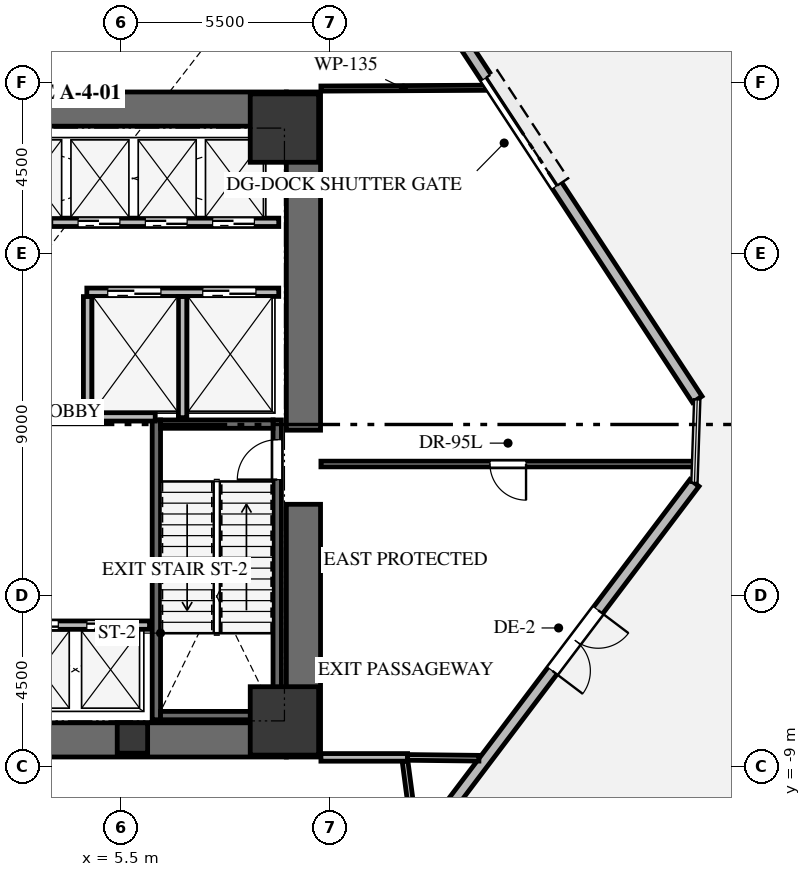
"""IFC4 building model, lengths in metres.
Left out: names, types, materials, properties, quantities, classifications, styles, units other than length and angle.
Written with IfcOpenShell. Run it as: python <this file> out.ifc"""

import sys

from ifc_helpers import new_model, si_unit, direction, frame, frame_2d, origin, origin_2d, place, context, subcontext, project, spatial, rectangle, extrude, source, transform, mapped, element, fill, save


model = new_model("IFC4")
c1 = context("Model", 3, precision=1e-05, world=origin(), true_north=direction((0.0, 1.0)))
c2 = subcontext(c1, "Body", "Model", "MODEL_VIEW")
j1 = project(units=[si_unit("LENGTHUNIT", "METRE"), si_unit("PLANEANGLEUNIT", "RADIAN")], contexts=[c1])
p1 = place(None, origin())
s1 = spatial("IfcSite", under=j1, at=p1, CompositionType="ELEMENT")
p2 = place(p1, origin())
s2 = spatial("IfcBuilding", under=s1, at=p2, CompositionType="ELEMENT")
p3 = place(p2, origin())
s3 = spatial("IfcBuildingStorey", under=s2, at=p3, CompositionType="ELEMENT", Elevation=0.0)
p4 = place(p3, frame((10.3, -8.75, 0.0), z_axis=(0.0, 0.0, 1.0), x_axis=(0.0, 1.0, 0.0)))
e1 = element("IfcWall", 1, at=p4, inside=s3, PredefinedType="SHEAR", context=c2, shape_type="SweptSolid", body=[
    extrude(rectangle(XDim=6.65, YDim=0.9, at=frame_2d((3.325, 0.0))), origin(), (0.0, 0.0, 1.0), 5.2),
])
p5 = place(p3, frame((10.3, -0.15, 0.0), z_axis=(0.0, 0.0, 1.0), x_axis=(0.0, 1.0, 0.0)))
e2 = element("IfcWall", 2, at=p5, inside=s3, PredefinedType="SHEAR", context=c2, shape_type="SweptSolid", body=[
    extrude(rectangle(XDim=8.9, YDim=0.9, at=frame_2d((4.45, 0.0))), origin(), (0.0, 0.0, 1.0), 5.2),
])
p6 = place(p3, frame((2.1, -8.3, 0.0), z_axis=(0.0, 0.0, 1.0), x_axis=(1.0, 0.0, 0.0)))
e3 = element("IfcWall", 3, at=p6, inside=s3, PredefinedType="SHEAR", context=c2, shape_type="SweptSolid", body=[
    extrude(rectangle(XDim=7.75, YDim=0.9, at=frame_2d((3.875, 0.0))), origin(), (0.0, 0.0, 1.0), 5.2),
])
p7 = place(p3, frame((1.9, 8.3, 0.0), z_axis=(0.0, 0.0, 1.0), x_axis=(1.0, 0.0, 0.0)))
e4 = element("IfcWall", 4, at=p7, inside=s3, PredefinedType="SHEAR", context=c2, shape_type="SweptSolid", body=[
    extrude(rectangle(XDim=7.95, YDim=0.9, at=frame_2d((3.975, 0.0))), origin(), (0.0, 0.0, 1.0), 5.2),
])
p8 = place(p3, frame((9.61, -7.77, -0.3), z_axis=(0.0, 0.0, 1.0), x_axis=(0.0, 1.0, 0.0)))
e5 = element("IfcWall", 5, at=p8, inside=s3, PredefinedType="SHEAR", context=c2, shape_type="SweptSolid", body=[
    extrude(rectangle(XDim=7.89, YDim=0.22, at=frame_2d((3.945, 0.0))), origin(), (0.0, 0.0, 1.0), 5.2),
])
p9 = place(p8, frame((6.32, 0.0, 0.0)))
e6 = element("IfcOpeningElement", 6, at=p9, cuts=e5, PredefinedType="OPENING", context=c2, shape_type="SweptSolid", body=[
    extrude(rectangle(XDim=1.05, YDim=2.15, at=frame_2d((0.525, 1.075))), frame((0.0, 0.12, 0.0), z_axis=(0.0, -1.0, 0.0), x_axis=(1.0, 0.0, 0.0)), (0.0, 0.0, 1.0), 0.24),
])
p10 = place(p3, frame((6.43, 0.12, -0.3), z_axis=(0.0, 0.0, 1.0), x_axis=(0.0, -1.0, 0.0)))
e7 = element("IfcWall", 7, at=p10, inside=s3, PredefinedType="SHEAR", context=c2, shape_type="SweptSolid", body=[
    extrude(rectangle(XDim=7.89, YDim=0.22, at=frame_2d((3.945, 0.0))), origin(), (0.0, 0.0, 1.0), 5.2),
])
for number, where, z_axis, x_axis in (
    (8, (6.54, -7.66, -0.3), (0.0, 0.0, 1.0), (1.0, 0.0, 0.0)),
    (9, (9.5, 0.01, -0.3), (0.0, 0.0, 1.0), (-1.0, 0.0, 0.0)),
):
    element("IfcWall", number, at=place(p3, frame(where, z_axis=z_axis, x_axis=x_axis)), inside=s3, PredefinedType="SHEAR", context=c2, shape_type="SweptSolid", body=[
        extrude(rectangle(XDim=2.96, YDim=0.22, at=frame_2d((1.48, 0.0))), origin(), (0.0, 0.0, 1.0), 5.2),
    ])
m1 = source(origin(), c2, "Body", "SweptSolid", [
    extrude(rectangle(XDim=1.8, YDim=1.8, at=origin_2d()), origin(), (0.0, 0.0, 1.0), 5.2),
])
for number, where, z_axis, x_axis in (
    (10, (9.8, -7.8, -0.3), (0.0, 0.0, 1.0), (1.0, 0.0, 0.0)),
    (11, (9.8, 7.8, -0.3), (0.0, 0.0, 1.0), (1.0, 0.0, 0.0)),
):
    element("IfcColumn", number, at=place(p3, frame(where, z_axis=z_axis, x_axis=x_axis)), inside=s3, PredefinedType="COLUMN", context=c2, shape_type="MappedRepresentation", body=[
        mapped(m1, transform((0.0, 0.0, 0.0), x_axis=(1.0, 0.0, 0.0), y_axis=(0.0, 1.0, 0.0), z_axis=(0.0, 0.0, 1.0), scale=1.0)),
    ])
m2 = source(origin(), c2, "Body", "SweptSolid", [
    extrude(rectangle(XDim=0.8, YDim=0.8, at=origin_2d()), origin(), (0.0, 0.0, 1.0), 5.2),
])
p11 = place(p3, frame((5.8, -8.25, -0.3), z_axis=(0.0, 0.0, 1.0), x_axis=(1.0, 0.0, 0.0)))
e12 = element("IfcColumn", 12, at=p11, inside=s3, PredefinedType="PILASTER", context=c2, shape_type="MappedRepresentation", body=[
    mapped(m2, transform((0.0, 0.0, 0.0), x_axis=(1.0, 0.0, 0.0), y_axis=(0.0, 1.0, 0.0), z_axis=(0.0, 0.0, 1.0), scale=1.0)),
])
p12 = place(p3, frame((11.422, 14.754, 0.0), z_axis=(0.0, 0.0, 1.0), x_axis=(0.548298501614, -0.836282699288, 0.0)))
e13 = element("IfcWall", 13, at=p12, inside=s3, PredefinedType="SOLIDWALL", context=c2, shape_type="SweptSolid", body=[
    extrude(rectangle(XDim=16.853, YDim=0.3, at=frame_2d((8.426, 0.0))), origin(), (0.0, 0.0, 1.0), 4.9),
])
p13 = place(p12, frame((6.726, 0.0, 0.0)))
e14 = element("IfcOpeningElement", 14, at=p13, cuts=e13, PredefinedType="OPENING", context=c2, shape_type="SweptSolid", body=[
    extrude(rectangle(XDim=3.4, YDim=4.2, at=frame_2d((1.7, 2.1))), frame((0.0, 0.16, 0.0), z_axis=(0.0, -1.0, 0.0), x_axis=(1.0, 0.0, 0.0)), (0.0, 0.0, 1.0), 0.32),
])
p14 = place(p3, frame((20.589, -1.538, 0.0), z_axis=(0.0, 0.0, 1.0), x_axis=(-0.603015201292, -0.797729695455, 0.0)))
e15 = element("IfcWall", 15, at=p14, inside=s3, PredefinedType="SOLIDWALL", context=c2, shape_type="SweptSolid", body=[
    extrude(rectangle(XDim=16.65, YDim=0.3, at=frame_2d((8.325, 0.0))), origin(), (0.0, 0.0, 1.0), 4.9),
])
p15 = place(p14, frame((4.2, 0.0, 0.0)))
e16 = element("IfcOpeningElement", 16, at=p15, cuts=e15, PredefinedType="OPENING", context=c2, shape_type="SweptSolid", body=[
    extrude(rectangle(XDim=2.0, YDim=2.3, at=frame_2d((1.0, 1.15))), frame((0.0, 0.16, 0.0), z_axis=(0.0, -1.0, 0.0), x_axis=(1.0, 0.0, 0.0)), (0.0, 0.0, 1.0), 0.32),
])
p16 = place(p3, frame((4.6, 3.48, 0.0), z_axis=(0.0, 0.0, 1.0), x_axis=(1.0, 0.0, 0.0)))
e17 = element("IfcWall", 17, at=p16, inside=s3, PredefinedType="SOLIDWALL", context=c2, shape_type="SweptSolid", body=[
    extrude(rectangle(XDim=5.05, YDim=0.22, at=frame_2d((2.525, 0.0))), origin(), (0.0, 0.0, 1.0), 4.885),
])
p17 = place(p16, frame((0.55, 0.0, 0.0)))
e18 = element("IfcOpeningElement", 18, at=p17, cuts=e17, PredefinedType="OPENING", context=c2, shape_type="SweptSolid", body=[
    extrude(rectangle(XDim=1.4, YDim=2.15, at=frame_2d((0.7, 1.075))), frame((0.0, 0.12, 0.0), z_axis=(0.0, -1.0, 0.0), x_axis=(1.0, 0.0, 0.0)), (0.0, 0.0, 1.0), 0.24),
])
p18 = place(p16, frame((3.05, 0.0, 0.0)))
e19 = element("IfcOpeningElement", 19, at=p18, cuts=e17, PredefinedType="OPENING", context=c2, shape_type="SweptSolid", body=[
    extrude(rectangle(XDim=1.4, YDim=2.15, at=frame_2d((0.7, 1.075))), frame((0.0, 0.12, 0.0), z_axis=(0.0, -1.0, 0.0), x_axis=(1.0, 0.0, 0.0)), (0.0, 0.0, 1.0), 0.24),
])
for number, where, z_axis, x_axis in (
    (20, (4.62, 0.18, 0.0), (0.0, 0.0, 1.0), (0.0, 1.0, 0.0)),
    (21, (7.12, 0.18, 0.0), (0.0, 0.0, 1.0), (0.0, 1.0, 0.0)),
):
    element("IfcWall", number, at=place(p3, frame(where, z_axis=z_axis, x_axis=x_axis)), inside=s3, PredefinedType="SOLIDWALL", context=c2, shape_type="SweptSolid", body=[
        extrude(rectangle(XDim=3.186, YDim=0.22, at=frame_2d((1.593, 0.0))), origin(), (0.0, 0.0, 1.0), 4.885),
    ])
p19 = place(p3, frame((4.734, 0.2, 0.0), z_axis=(0.0, 0.0, 1.0), x_axis=(1.0, 0.0, 0.0)))
e22 = element("IfcWall", 22, at=p19, inside=s3, PredefinedType="SOLIDWALL", context=c2, shape_type="SweptSolid", body=[
    extrude(rectangle(XDim=1.666, YDim=0.22, at=frame_2d((0.833, 0.0))), origin(), (0.0, 0.0, 1.0), 4.885),
])
p20 = place(p3, frame((2.35, -5.28, 0.0), z_axis=(0.0, 0.0, 1.0), x_axis=(1.0, 0.0, 0.0)))
e23 = element("IfcWall", 23, at=p20, inside=s3, PredefinedType="SOLIDWALL", context=c2, shape_type="SweptSolid", body=[
    extrude(rectangle(XDim=3.9, YDim=0.22, at=frame_2d((1.95, 0.0))), origin(), (0.0, 0.0, 1.0), 4.885),
])
p21 = place(p20, frame((0.4, 0.0, 0.0)))
e24 = element("IfcOpeningElement", 24, at=p21, cuts=e23, PredefinedType="OPENING", context=c2, shape_type="SweptSolid", body=[
    extrude(rectangle(XDim=1.1, YDim=2.15, at=frame_2d((0.55, 1.075))), frame((0.0, 0.12, 0.0), z_axis=(0.0, -1.0, 0.0), x_axis=(1.0, 0.0, 0.0)), (0.0, 0.0, 1.0), 0.24),
])
p22 = place(p20, frame((2.25, 0.0, 0.0)))
e25 = element("IfcOpeningElement", 25, at=p22, cuts=e23, PredefinedType="OPENING", context=c2, shape_type="SweptSolid", body=[
    extrude(rectangle(XDim=1.1, YDim=2.15, at=frame_2d((0.55, 1.075))), frame((0.0, 0.12, 0.0), z_axis=(0.0, -1.0, 0.0), x_axis=(1.0, 0.0, 0.0)), (0.0, 0.0, 1.0), 0.24),
])
p23 = place(p3, frame((2.325, 5.32, 0.0), z_axis=(0.0, 0.0, 1.0), x_axis=(1.0, 0.0, 0.0)))
e26 = element("IfcWall", 26, at=p23, inside=s3, PredefinedType="SOLIDWALL", context=c2, shape_type="SweptSolid", body=[
    extrude(rectangle(XDim=7.325, YDim=0.22, at=frame_2d((3.663, 0.0))), origin(), (0.0, 0.0, 1.0), 4.885),
])
p24 = place(p23, frame((0.275, 0.0, 0.0)))
e27 = element("IfcOpeningElement", 27, at=p24, cuts=e26, PredefinedType="OPENING", context=c2, shape_type="SweptSolid", body=[
    extrude(rectangle(XDim=1.1, YDim=2.15, at=frame_2d((0.55, 1.075))), frame((0.0, 0.12, 0.0), z_axis=(0.0, -1.0, 0.0), x_axis=(1.0, 0.0, 0.0)), (0.0, 0.0, 1.0), 0.24),
])
p25 = place(p23, frame((2.045, 0.0, 0.0)))
e28 = element("IfcOpeningElement", 28, at=p25, cuts=e26, PredefinedType="OPENING", context=c2, shape_type="SweptSolid", body=[
    extrude(rectangle(XDim=1.1, YDim=2.15, at=frame_2d((0.55, 1.075))), frame((0.0, 0.12, 0.0), z_axis=(0.0, -1.0, 0.0), x_axis=(1.0, 0.0, 0.0)), (0.0, 0.0, 1.0), 0.24),
])
p26 = place(p23, frame((3.815, 0.0, 0.0)))
e29 = element("IfcOpeningElement", 29, at=p26, cuts=e26, PredefinedType="OPENING", context=c2, shape_type="SweptSolid", body=[
    extrude(rectangle(XDim=1.1, YDim=2.15, at=frame_2d((0.55, 1.075))), frame((0.0, 0.12, 0.0), z_axis=(0.0, -1.0, 0.0), x_axis=(1.0, 0.0, 0.0)), (0.0, 0.0, 1.0), 0.24),
])
p27 = place(p23, frame((5.585, 0.0, 0.0)))
e30 = element("IfcOpeningElement", 30, at=p27, cuts=e26, PredefinedType="OPENING", context=c2, shape_type="SweptSolid", body=[
    extrude(rectangle(XDim=1.1, YDim=2.15, at=frame_2d((0.55, 1.075))), frame((0.0, 0.12, 0.0), z_axis=(0.0, -1.0, 0.0), x_axis=(1.0, 0.0, 0.0)), (0.0, 0.0, 1.0), 0.24),
])
p28 = place(p3, frame((10.76, -8.76, 0.0), z_axis=(0.0, 0.0, 1.0), x_axis=(1.0, 0.0, 0.0)))
e31 = element("IfcWall", 31, at=p28, inside=s3, PredefinedType="SOLIDWALL", context=c2, shape_type="SweptSolid", body=[
    extrude(rectangle(XDim=2.28, YDim=0.2, at=frame_2d((1.14, 0.0))), origin(), (0.0, 0.0, 1.0), 4.885),
])
p29 = place(p3, frame((20.605, -1.041, 0.0), z_axis=(0.0, 0.0, 1.0), x_axis=(-0.999999992313, 0.000123989485, 0.0)))
e32 = element("IfcWall", 32, at=p29, inside=s3, PredefinedType="PARTITIONING", context=c2, shape_type="SweptSolid", body=[
    extrude(rectangle(XDim=9.845, YDim=0.15, at=frame_2d((4.923, 0.0))), origin(), (0.0, 0.0, 1.0), 4.885),
])
p30 = place(p29, frame((4.448, 0.0, 0.0)))
e33 = element("IfcOpeningElement", 33, at=p30, cuts=e32, PredefinedType="OPENING", context=c2, shape_type="SweptSolid", body=[
    extrude(rectangle(XDim=0.95, YDim=2.1, at=frame_2d((0.475, 1.05))), frame((0.0, 0.085, 0.0), z_axis=(0.0, -1.0, 0.0), x_axis=(1.0, 0.0, 0.0)), (0.0, 0.0, 1.0), 0.17),
])
p31 = place(p3, frame((13.253, -10.985, 0.0), z_axis=(0.0, 0.0, 1.0), x_axis=(-0.130802903256, 0.991408392389, 0.0)))
e34 = element("IfcWall", 34, at=p31, inside=s3, PredefinedType="PARTITIONING", context=c2, shape_type="SweptSolid", body=[
    extrude(rectangle(XDim=2.139, YDim=0.15, at=frame_2d((1.069, 0.0))), origin(), (0.0, 0.0, 1.0), 4.885),
])
p32 = place(p3, frame((13.04, -8.761, 0.0), z_axis=(0.0, 0.0, 1.0), x_axis=(0.999937520904, -0.011178295437, 0.0)))
e35 = element("IfcWall", 35, at=p32, inside=s3, PredefinedType="PARTITIONING", context=c2, shape_type="SweptSolid", body=[
    extrude(rectangle(XDim=1.878, YDim=0.15, at=frame_2d((0.939, 0.0))), origin(), (0.0, 0.0, 1.0), 4.885),
])
p33 = place(p3, frame((10.76, 8.84, 0.0), z_axis=(0.0, 0.0, 1.0), x_axis=(0.999988301111, 0.004837110855, 0.0)))
e36 = element("IfcWall", 36, at=p33, inside=s3, PredefinedType="PARTITIONING", context=c2, shape_type="SweptSolid", body=[
    extrude(rectangle(XDim=4.341, YDim=0.135, at=frame_2d((2.17, 0.0))), origin(), (0.0, 0.0, 1.0), 4.885),
])
m3 = source(origin(), c2, "Body", "SweptSolid", [
    extrude(rectangle(XDim=3.4, YDim=4.2, at=frame_2d((1.7, 2.1))), frame((0.0, 0.025, 0.0), z_axis=(0.0, -1.0, 0.0), x_axis=(1.0, 0.0, 0.0)), (0.0, 0.0, 1.0), 0.05),
])
p34 = place(p13, origin())
e37 = element("IfcDoor", 37, at=p34, inside=s3, OperationType="ROLLINGUP", PredefinedType="GATE", context=c2, shape_type="MappedRepresentation", body=[
    mapped(m3, transform((0.0, 0.0, 0.0), x_axis=(1.0, 0.0, 0.0), y_axis=(0.0, 1.0, 0.0), z_axis=(0.0, 0.0, 1.0), scale=1.0)),
])
fill(e14, e37)
m4 = source(origin(), c2, "Body", "SweptSolid", [
    extrude(rectangle(XDim=2.0, YDim=2.3, at=frame_2d((1.0, 1.15))), frame((0.0, 0.025, 0.0), z_axis=(0.0, -1.0, 0.0), x_axis=(1.0, 0.0, 0.0)), (0.0, 0.0, 1.0), 0.05),
])
p35 = place(p15, origin())
e38 = element("IfcDoor", 38, at=p35, inside=s3, OperationType="DOUBLE_DOOR_SINGLE_SWING", PredefinedType="DOOR", context=c2, shape_type="MappedRepresentation", body=[
    mapped(m4, transform((0.0, 0.0, 0.0), x_axis=(1.0, 0.0, 0.0), y_axis=(0.0, 1.0, 0.0), z_axis=(0.0, 0.0, 1.0), scale=1.0)),
])
fill(e16, e38)
m5 = source(origin(), c2, "Body", "SweptSolid", [
    extrude(rectangle(XDim=1.05, YDim=2.15, at=frame_2d((0.525, 1.075))), frame((0.0, 0.025, 0.0), z_axis=(0.0, -1.0, 0.0), x_axis=(1.0, 0.0, 0.0)), (0.0, 0.0, 1.0), 0.05),
])
p36 = place(p9, origin())
e39 = element("IfcDoor", 39, at=p36, inside=s3, OperationType="SINGLE_SWING_LEFT", PredefinedType="DOOR", context=c2, shape_type="MappedRepresentation", body=[
    mapped(m5, transform((0.0, 0.0, 0.0), x_axis=(1.0, 0.0, 0.0), y_axis=(0.0, 1.0, 0.0), z_axis=(0.0, 0.0, 1.0), scale=1.0)),
])
fill(e6, e39)
m6 = source(origin(), c2, "Body", "SweptSolid", [
    extrude(rectangle(XDim=1.4, YDim=2.15, at=frame_2d((0.7, 1.075))), frame((0.0, 0.025, 0.0), z_axis=(0.0, -1.0, 0.0), x_axis=(1.0, 0.0, 0.0)), (0.0, 0.0, 1.0), 0.05),
])
p37 = place(p17, origin())
e40 = element("IfcDoor", 40, at=p37, inside=s3, OperationType="DOUBLE_DOOR_SLIDING", PredefinedType="DOOR", context=c2, shape_type="MappedRepresentation", body=[
    mapped(m6, transform((0.0, 0.0, 0.0), x_axis=(1.0, 0.0, 0.0), y_axis=(0.0, 1.0, 0.0), z_axis=(0.0, 0.0, 1.0), scale=1.0)),
])
fill(e18, e40)
p38 = place(p18, origin())
e41 = element("IfcDoor", 41, at=p38, inside=s3, OperationType="DOUBLE_DOOR_SLIDING", PredefinedType="DOOR", context=c2, shape_type="MappedRepresentation", body=[
    mapped(m6, transform((0.0, 0.0, 0.0), x_axis=(1.0, 0.0, 0.0), y_axis=(0.0, 1.0, 0.0), z_axis=(0.0, 0.0, 1.0), scale=1.0)),
])
fill(e19, e41)
m7 = source(origin(), c2, "Body", "SweptSolid", [
    extrude(rectangle(XDim=1.1, YDim=2.15, at=frame_2d((0.55, 1.075))), frame((0.0, 0.025, 0.0), z_axis=(0.0, -1.0, 0.0), x_axis=(1.0, 0.0, 0.0)), (0.0, 0.0, 1.0), 0.05),
])
p39 = place(p21, origin())
e42 = element("IfcDoor", 42, at=p39, inside=s3, OperationType="DOUBLE_DOOR_SLIDING", PredefinedType="DOOR", context=c2, shape_type="MappedRepresentation", body=[
    mapped(m7, transform((0.0, 0.0, 0.0), x_axis=(1.0, 0.0, 0.0), y_axis=(0.0, 1.0, 0.0), z_axis=(0.0, 0.0, 1.0), scale=1.0)),
])
fill(e24, e42)
p40 = place(p22, origin())
e43 = element("IfcDoor", 43, at=p40, inside=s3, OperationType="DOUBLE_DOOR_SLIDING", PredefinedType="DOOR", context=c2, shape_type="MappedRepresentation", body=[
    mapped(m7, transform((0.0, 0.0, 0.0), x_axis=(1.0, 0.0, 0.0), y_axis=(0.0, 1.0, 0.0), z_axis=(0.0, 0.0, 1.0), scale=1.0)),
])
fill(e25, e43)
p41 = place(p25, origin())
e44 = element("IfcDoor", 44, at=p41, inside=s3, OperationType="DOUBLE_DOOR_SLIDING", PredefinedType="DOOR", context=c2, shape_type="MappedRepresentation", body=[
    mapped(m7, transform((0.0, 0.0, 0.0), x_axis=(1.0, 0.0, 0.0), y_axis=(0.0, 1.0, 0.0), z_axis=(0.0, 0.0, 1.0), scale=1.0)),
])
fill(e28, e44)
p42 = place(p26, origin())
e45 = element("IfcDoor", 45, at=p42, inside=s3, OperationType="DOUBLE_DOOR_SLIDING", PredefinedType="DOOR", context=c2, shape_type="MappedRepresentation", body=[
    mapped(m7, transform((0.0, 0.0, 0.0), x_axis=(1.0, 0.0, 0.0), y_axis=(0.0, 1.0, 0.0), z_axis=(0.0, 0.0, 1.0), scale=1.0)),
])
fill(e29, e45)
p43 = place(p27, origin())
e46 = element("IfcDoor", 46, at=p43, inside=s3, OperationType="DOUBLE_DOOR_SLIDING", PredefinedType="DOOR", context=c2, shape_type="MappedRepresentation", body=[
    mapped(m7, transform((0.0, 0.0, 0.0), x_axis=(1.0, 0.0, 0.0), y_axis=(0.0, 1.0, 0.0), z_axis=(0.0, 0.0, 1.0), scale=1.0)),
])
fill(e30, e46)
m8 = source(origin(), c2, "Body", "SweptSolid", [
    extrude(rectangle(XDim=0.95, YDim=2.1, at=frame_2d((0.475, 1.05))), frame((0.0, 0.025, 0.0), z_axis=(0.0, -1.0, 0.0), x_axis=(1.0, 0.0, 0.0)), (0.0, 0.0, 1.0), 0.05),
])
p44 = place(p30, origin())
e47 = element("IfcDoor", 47, at=p44, inside=s3, OperationType="SINGLE_SWING_LEFT", PredefinedType="DOOR", context=c2, shape_type="MappedRepresentation", body=[
    mapped(m8, transform((0.0, 0.0, 0.0), x_axis=(1.0, 0.0, 0.0), y_axis=(0.0, 1.0, 0.0), z_axis=(0.0, 0.0, 1.0), scale=1.0)),
])
fill(e33, e47)
save(model, sys.argv[1])
